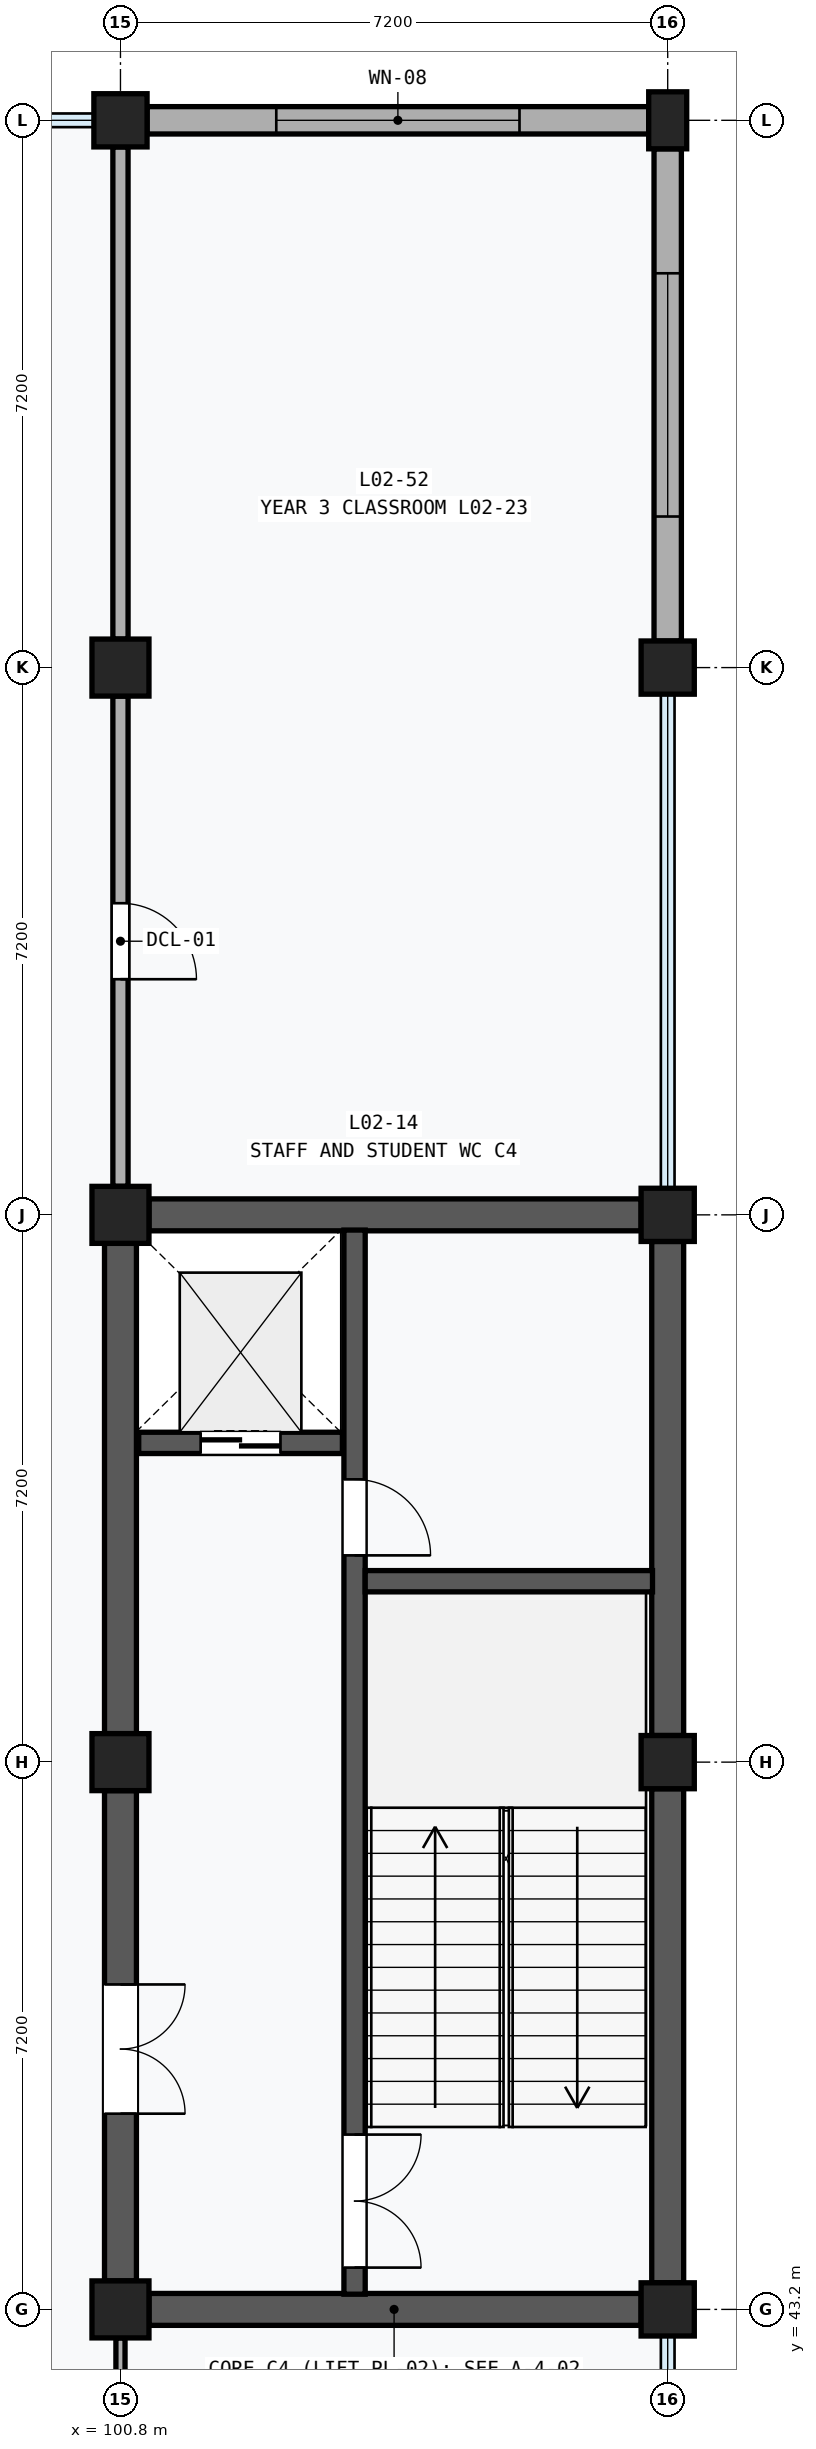
"""IFC4 building model, lengths in metres.
Left out: names, types, materials, properties, quantities, classifications, styles, units other than length and angle.
Written with IfcOpenShell. Run it as: python <this file> out.ifc"""

import sys

from ifc_helpers import new_model, si_unit, direction, frame, frame_2d, origin, origin_2d, place, context, subcontext, project, spatial, rectangle, extrude, element, fill, save


model = new_model("IFC4")
c1 = context("Model", 3, precision=1e-05, world=origin(), true_north=direction((0.0, 1.0)))
c2 = subcontext(c1, "Body", "Model", "MODEL_VIEW")
j1 = project(units=[si_unit("LENGTHUNIT", "METRE"), si_unit("PLANEANGLEUNIT", "RADIAN")], contexts=[c1])
p1 = place(None, origin())
s1 = spatial("IfcSite", under=j1, at=p1, CompositionType="ELEMENT")
p2 = place(p1, origin())
s2 = spatial("IfcBuilding", under=s1, at=p2, CompositionType="ELEMENT")
p3 = place(p2, frame((0.0, 0.0, 9.6)))
s3 = spatial("IfcBuildingStorey", under=s2, at=p3, CompositionType="ELEMENT", Elevation=9.6)
for number, where, z_axis, x_axis in (
    (1, (100.8, 43.2, 0.0), (0.0, 0.0, 1.0), (1.0, 0.0, 0.0)),
    (2, (100.8, 50.4, 0.0), (0.0, 0.0, 1.0), (1.0, 0.0, 0.0)),
    (3, (100.8, 57.6, 0.0), (0.0, 0.0, 1.0), (1.0, 0.0, 0.0)),
    (4, (100.8, 64.8, 0.0), (0.0, 0.0, 1.0), (1.0, 0.0, 0.0)),
):
    element("IfcColumn", number, at=place(p3, frame(where, z_axis=z_axis, x_axis=x_axis)), inside=s3, PredefinedType="COLUMN", context=c2, shape_type="SweptSolid", body=[
        extrude(rectangle(XDim=0.75, YDim=0.75, at=origin_2d()), origin(), (0.0, 0.0, 1.0), 4.8),
    ])
for number, where, z_axis, x_axis in (
    (5, (100.8, 72.0, 0.0), (0.0, 0.0, 1.0), (1.0, 0.0, 0.0)),
    (6, (108.0, 43.2, 0.0), (0.0, 0.0, 1.0), (1.0, 0.0, 0.0)),
    (7, (108.0, 50.4, 0.0), (0.0, 0.0, 1.0), (1.0, 0.0, 0.0)),
    (8, (108.0, 57.6, 0.0), (0.0, 0.0, 1.0), (1.0, 0.0, 0.0)),
    (9, (108.0, 64.8, 0.0), (0.0, 0.0, 1.0), (1.0, 0.0, 0.0)),
):
    element("IfcColumn", number, at=place(p3, frame(where, z_axis=z_axis, x_axis=x_axis)), inside=s3, PredefinedType="COLUMN", context=c2, shape_type="SweptSolid", body=[
        extrude(rectangle(XDim=0.7, YDim=0.7, at=origin_2d()), origin(), (0.0, 0.0, 1.0), 4.8),
    ])
p4 = place(p3, frame((108.0, 72.0, 0.0), z_axis=(0.0, 0.0, 1.0), x_axis=(1.0, 0.0, 0.0)))
e10 = element("IfcColumn", 10, at=p4, inside=s3, PredefinedType="PILASTER", context=c2, shape_type="SweptSolid", body=[
    extrude(rectangle(XDim=0.5, YDim=0.75, at=origin_2d()), origin(), (0.0, 0.0, 1.0), 4.8),
])
p5 = place(p3, frame((101.15, 72.0, 0.0), z_axis=(0.0, 0.0, 1.0), x_axis=(1.0, 0.0, 0.0)))
e11 = element("IfcWall", 11, at=p5, inside=s3, PredefinedType="SOLIDWALL", context=c2, shape_type="SweptSolid", body=[
    extrude(rectangle(XDim=6.6, YDim=0.36, at=frame_2d((3.3, 0.0))), origin(), (0.0, 0.0, 1.0), 3.88),
])
p6 = place(p5, frame((1.7, 0.0, 0.9)))
e12 = element("IfcOpeningElement", 12, at=p6, cuts=e11, PredefinedType="OPENING", context=c2, shape_type="SweptSolid", body=[
    extrude(rectangle(XDim=3.2, YDim=1.8, at=frame_2d((1.6, 0.9))), frame((0.0, 0.192, 0.0), z_axis=(0.0, -1.0, 0.0), x_axis=(1.0, 0.0, 0.0)), (0.0, 0.0, 1.0), 0.384),
])
p7 = place(p3, frame((108.0, 65.15, 0.0), z_axis=(0.0, 0.0, 1.0), x_axis=(0.0, 1.0, 0.0)))
e13 = element("IfcWall", 13, at=p7, inside=s3, PredefinedType="SOLIDWALL", context=c2, shape_type="SweptSolid", body=[
    extrude(rectangle(XDim=6.475, YDim=0.36, at=frame_2d((3.238, 0.0))), origin(), (0.0, 0.0, 1.0), 3.88),
])
p8 = place(p7, frame((1.637, 0.0, 0.9)))
e14 = element("IfcOpeningElement", 14, at=p8, cuts=e13, PredefinedType="OPENING", context=c2, shape_type="SweptSolid", body=[
    extrude(rectangle(XDim=3.2, YDim=1.8, at=frame_2d((1.6, 0.9))), frame((0.0, 0.192, 0.0), z_axis=(0.0, -1.0, 0.0), x_axis=(1.0, 0.0, 0.0)), (0.0, 0.0, 1.0), 0.384),
])
p9 = place(p3, frame((100.8, 43.575, 0.0), z_axis=(0.0, 0.0, 1.0), x_axis=(0.0, 1.0, 0.0)))
e15 = element("IfcWall", 15, at=p9, inside=s3, PredefinedType="SHEAR", context=c2, shape_type="SweptSolid", body=[
    extrude(rectangle(XDim=6.45, YDim=0.42, at=frame_2d((3.225, 0.0))), origin(), (0.0, 0.0, 1.0), 3.74),
])
p10 = place(p9, frame((2.2, 0.0, 0.0)))
e16 = element("IfcOpeningElement", 16, at=p10, cuts=e15, PredefinedType="OPENING", context=c2, shape_type="SweptSolid", body=[
    extrude(rectangle(XDim=1.7, YDim=2.25, at=frame_2d((0.85, 1.125))), frame((0.0, 0.222, 0.0), z_axis=(0.0, -1.0, 0.0), x_axis=(1.0, 0.0, 0.0)), (0.0, 0.0, 1.0), 0.444),
])
p11 = place(p3, frame((100.8, 50.775, 0.0), z_axis=(0.0, 0.0, 1.0), x_axis=(0.0, 1.0, 0.0)))
e17 = element("IfcWall", 17, at=p11, inside=s3, PredefinedType="SHEAR", context=c2, shape_type="SweptSolid", body=[
    extrude(rectangle(XDim=6.45, YDim=0.42, at=frame_2d((3.225, 0.0))), origin(), (0.0, 0.0, 1.0), 3.74),
])
for number, where, z_axis, x_axis in (
    (18, (108.0, 43.55, 0.0), (0.0, 0.0, 1.0), (0.0, 1.0, 0.0)),
    (19, (108.0, 50.75, 0.0), (0.0, 0.0, 1.0), (0.0, 1.0, 0.0)),
):
    element("IfcWall", number, at=place(p3, frame(where, z_axis=z_axis, x_axis=x_axis)), inside=s3, PredefinedType="SHEAR", context=c2, shape_type="SweptSolid", body=[
        extrude(rectangle(XDim=6.5, YDim=0.42, at=frame_2d((3.25, 0.0))), origin(), (0.0, 0.0, 1.0), 3.88),
    ])
p12 = place(p3, frame((101.175, 43.2, 0.0), z_axis=(0.0, 0.0, 1.0), x_axis=(1.0, 0.0, 0.0)))
e20 = element("IfcWall", 20, at=p12, inside=s3, PredefinedType="SHEAR", context=c2, shape_type="SweptSolid", body=[
    extrude(rectangle(XDim=6.475, YDim=0.42, at=frame_2d((3.237, 0.0))), origin(), (0.0, 0.0, 1.0), 3.81),
])
p13 = place(p3, frame((101.175, 57.6, 0.0), z_axis=(0.0, 0.0, 1.0), x_axis=(1.0, 0.0, 0.0)))
e21 = element("IfcWall", 21, at=p13, inside=s3, PredefinedType="SHEAR", context=c2, shape_type="SweptSolid", body=[
    extrude(rectangle(XDim=6.475, YDim=0.42, at=frame_2d((3.237, 0.0))), origin(), (0.0, 0.0, 1.0), 3.74),
])
p14 = place(p3, frame((103.88, 43.4, 0.0), z_axis=(0.0, 0.0, 1.0), x_axis=(0.0, 1.0, 0.0)))
e22 = element("IfcWall", 22, at=p14, inside=s3, PredefinedType="SHEAR", context=c2, shape_type="SweptSolid", body=[
    extrude(rectangle(XDim=14.0, YDim=0.28, at=frame_2d((7.0, 0.0))), origin(), (0.0, 0.0, 1.0), 4.51),
])
p15 = place(p14, frame((0.35, 0.0, 0.0)))
e23 = element("IfcOpeningElement", 23, at=p15, cuts=e22, PredefinedType="OPENING", context=c2, shape_type="SweptSolid", body=[
    extrude(rectangle(XDim=1.75, YDim=2.15, at=frame_2d((0.875, 1.075))), frame((0.0, 0.152, 0.0), z_axis=(0.0, -1.0, 0.0), x_axis=(1.0, 0.0, 0.0)), (0.0, 0.0, 1.0), 0.304),
])
p16 = place(p14, frame((9.72, 0.0, 0.0)))
e24 = element("IfcOpeningElement", 24, at=p16, cuts=e22, PredefinedType="OPENING", context=c2, shape_type="SweptSolid", body=[
    extrude(rectangle(XDim=1.0, YDim=2.15, at=frame_2d((0.5, 1.075))), frame((0.0, 0.152, 0.0), z_axis=(0.0, -1.0, 0.0), x_axis=(1.0, 0.0, 0.0)), (0.0, 0.0, 1.0), 0.304),
])
p17 = place(p3, frame((104.02, 52.78, 0.0), z_axis=(0.0, 0.0, 1.0), x_axis=(1.0, 0.0, 0.0)))
e25 = element("IfcWall", 25, at=p17, inside=s3, PredefinedType="SHEAR", context=c2, shape_type="SweptSolid", body=[
    extrude(rectangle(XDim=3.78, YDim=0.28, at=frame_2d((1.89, 0.0))), origin(), (0.0, 0.0, 1.0), 4.51),
])
p18 = place(p3, frame((101.04, 54.6, 0.0), z_axis=(0.0, 0.0, 1.0), x_axis=(1.0, 0.0, 0.0)))
e26 = element("IfcWall", 26, at=p18, inside=s3, PredefinedType="SHEAR", context=c2, shape_type="SweptSolid", body=[
    extrude(rectangle(XDim=2.68, YDim=0.28, at=frame_2d((1.34, 0.0))), origin(), (0.0, 0.0, 1.0), 4.51),
])
p19 = place(p18, frame((0.815, 0.0, 0.0)))
e27 = element("IfcOpeningElement", 27, at=p19, cuts=e26, PredefinedType="OPENING", context=c2, shape_type="SweptSolid", body=[
    extrude(rectangle(XDim=1.05, YDim=2.2, at=frame_2d((0.525, 1.1))), frame((0.0, 0.152, 0.0), z_axis=(0.0, -1.0, 0.0), x_axis=(1.0, 0.0, 0.0)), (0.0, 0.0, 1.0), 0.304),
])
p20 = place(p3, frame((100.8, 36.375, 0.0), z_axis=(0.0, 0.0, 1.0), x_axis=(0.0, 1.0, 0.0)))
e28 = element("IfcWall", 28, at=p20, inside=s3, PredefinedType="MOVABLE", context=c2, shape_type="SweptSolid", body=[
    extrude(rectangle(XDim=6.45, YDim=0.12, at=frame_2d((3.225, 0.0))), origin(), (0.0, 0.0, 1.0), 3.74),
])
p21 = place(p3, frame((100.8, 57.975, 0.0), z_axis=(0.0, 0.0, 1.0), x_axis=(0.0, 1.0, 0.0)))
e29 = element("IfcWall", 29, at=p21, inside=s3, PredefinedType="PARTITIONING", context=c2, shape_type="SweptSolid", body=[
    extrude(rectangle(XDim=6.45, YDim=0.2, at=frame_2d((3.225, 0.0))), origin(), (0.0, 0.0, 1.0), 3.74),
])
p22 = place(p21, frame((2.725, 0.0, 0.0)))
e30 = element("IfcOpeningElement", 30, at=p22, cuts=e29, PredefinedType="OPENING", context=c2, shape_type="SweptSolid", body=[
    extrude(rectangle(XDim=1.0, YDim=2.1, at=frame_2d((0.5, 1.05))), frame((0.0, 0.112, 0.0), z_axis=(0.0, -1.0, 0.0), x_axis=(1.0, 0.0, 0.0)), (0.0, 0.0, 1.0), 0.224),
])
p23 = place(p3, frame((100.8, 65.175, 0.0), z_axis=(0.0, 0.0, 1.0), x_axis=(0.0, 1.0, 0.0)))
e31 = element("IfcWall", 31, at=p23, inside=s3, PredefinedType="PARTITIONING", context=c2, shape_type="SweptSolid", body=[
    extrude(rectangle(XDim=6.475, YDim=0.2, at=frame_2d((3.237, 0.0))), origin(), (0.0, 0.0, 1.0), 3.74),
])
p24 = place(p6, origin())
e32 = element("IfcWindow", 32, at=p24, inside=s3, PartitioningType="SINGLE_PANEL", PredefinedType="WINDOW", context=c2, shape_type="SweptSolid", body=[
    extrude(rectangle(XDim=3.2, YDim=1.8, at=frame_2d((1.6, 0.9))), frame((0.0, 0.03, 0.0), z_axis=(0.0, -1.0, 0.0), x_axis=(1.0, 0.0, 0.0)), (0.0, 0.0, 1.0), 0.06),
])
fill(e12, e32)
p25 = place(p8, origin())
e33 = element("IfcWindow", 33, at=p25, inside=s3, PartitioningType="SINGLE_PANEL", PredefinedType="WINDOW", context=c2, shape_type="SweptSolid", body=[
    extrude(rectangle(XDim=3.2, YDim=1.8, at=frame_2d((1.6, 0.9))), frame((0.0, 0.03, 0.0), z_axis=(0.0, -1.0, 0.0), x_axis=(1.0, 0.0, 0.0)), (0.0, 0.0, 1.0), 0.06),
])
fill(e14, e33)
p26 = place(p10, frame((1.7, 0.0, 0.0), z_axis=(0.0, 0.0, 1.0), x_axis=(-1.0, 0.0, 0.0)))
e34 = element("IfcDoor", 34, at=p26, inside=s3, OperationType="DOUBLE_DOOR_SINGLE_SWING", PredefinedType="DOOR", context=c2, shape_type="SweptSolid", body=[
    extrude(rectangle(XDim=1.7, YDim=2.25, at=frame_2d((0.85, 1.125))), frame((0.0, 0.025, 0.0), z_axis=(0.0, -1.0, 0.0), x_axis=(1.0, 0.0, 0.0)), (0.0, 0.0, 1.0), 0.05),
])
fill(e16, e34)
p27 = place(p15, frame((1.75, 0.0, 0.0), z_axis=(0.0, 0.0, 1.0), x_axis=(-1.0, 0.0, 0.0)))
e35 = element("IfcDoor", 35, at=p27, inside=s3, OperationType="DOUBLE_DOOR_SINGLE_SWING", PredefinedType="DOOR", context=c2, shape_type="SweptSolid", body=[
    extrude(rectangle(XDim=1.75, YDim=2.15, at=frame_2d((0.875, 1.075))), frame((0.0, 0.025, 0.0), z_axis=(0.0, -1.0, 0.0), x_axis=(1.0, 0.0, 0.0)), (0.0, 0.0, 1.0), 0.05),
])
fill(e23, e35)
p28 = place(p16, frame((1.0, 0.0, 0.0), z_axis=(0.0, 0.0, 1.0), x_axis=(-1.0, 0.0, 0.0)))
e36 = element("IfcDoor", 36, at=p28, inside=s3, OperationType="SINGLE_SWING_RIGHT", PredefinedType="DOOR", context=c2, shape_type="SweptSolid", body=[
    extrude(rectangle(XDim=1.0, YDim=2.15, at=frame_2d((0.5, 1.075))), frame((0.0, 0.025, 0.0), z_axis=(0.0, -1.0, 0.0), x_axis=(1.0, 0.0, 0.0)), (0.0, 0.0, 1.0), 0.05),
])
fill(e24, e36)
p29 = place(p19, frame((1.05, 0.0, 0.0), z_axis=(0.0, 0.0, 1.0), x_axis=(-1.0, 0.0, 0.0)))
e37 = element("IfcDoor", 37, at=p29, inside=s3, OperationType="DOUBLE_DOOR_SLIDING", PredefinedType="DOOR", context=c2, shape_type="SweptSolid", body=[
    extrude(rectangle(XDim=1.05, YDim=2.2, at=frame_2d((0.525, 1.1))), frame((0.0, 0.025, 0.0), z_axis=(0.0, -1.0, 0.0), x_axis=(1.0, 0.0, 0.0)), (0.0, 0.0, 1.0), 0.05),
])
fill(e27, e37)
p30 = place(p22, frame((1.0, 0.0, 0.0), z_axis=(0.0, 0.0, 1.0), x_axis=(-1.0, 0.0, 0.0)))
e38 = element("IfcDoor", 38, at=p30, inside=s3, OperationType="SINGLE_SWING_RIGHT", PredefinedType="DOOR", context=c2, shape_type="SweptSolid", body=[
    extrude(rectangle(XDim=1.0, YDim=2.1, at=frame_2d((0.5, 1.05))), frame((0.0, 0.025, 0.0), z_axis=(0.0, -1.0, 0.0), x_axis=(1.0, 0.0, 0.0)), (0.0, 0.0, 1.0), 0.05),
])
fill(e30, e38)
save(model, sys.argv[1])
